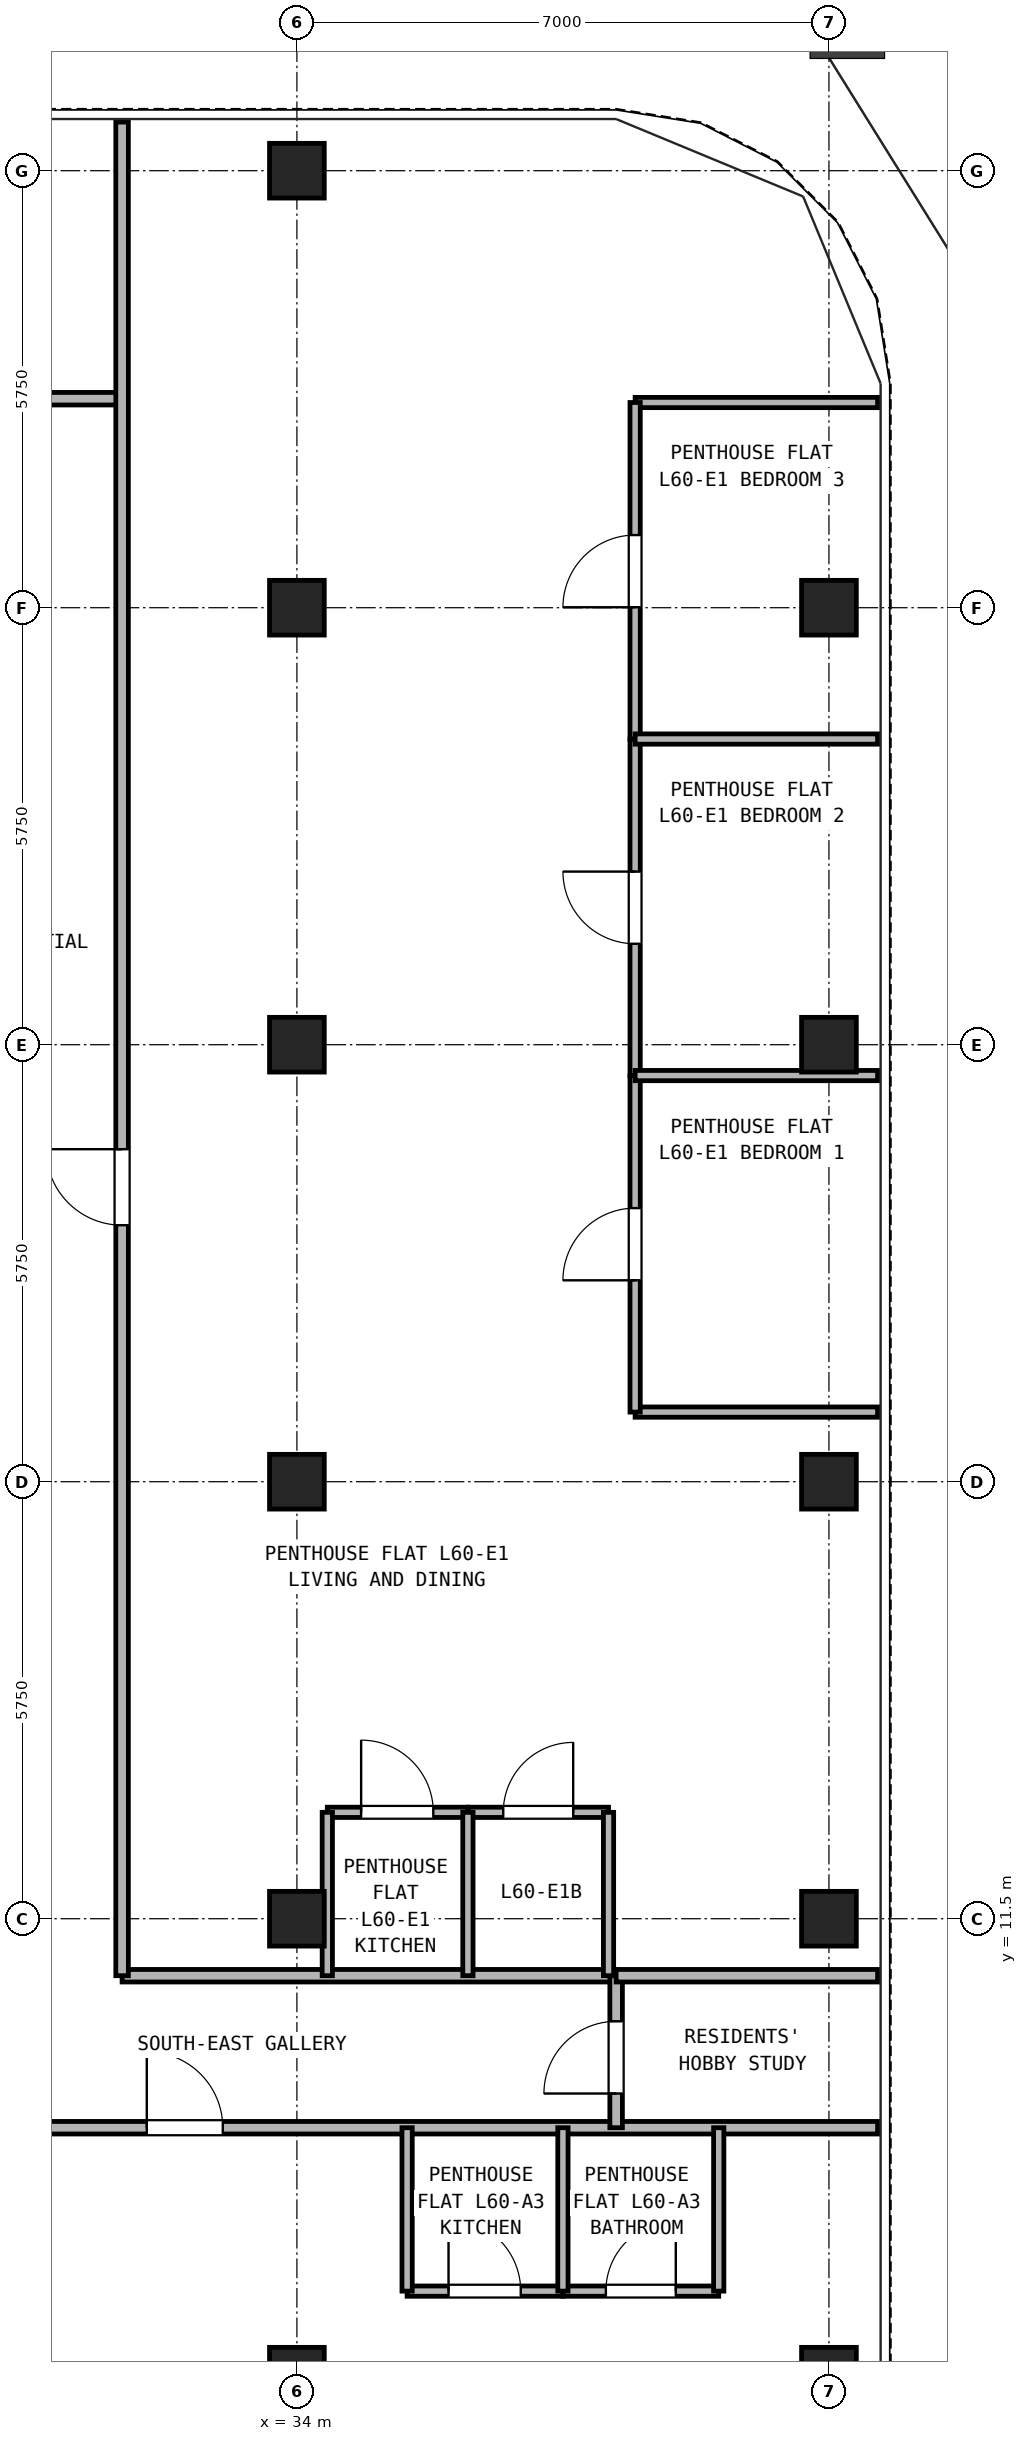
"""IFC4 building model, lengths in metres.
Left out: names, types, materials, properties, quantities, classifications, styles, units other than length and angle.
Written with IfcOpenShell. Run it as: python <this file> out.ifc"""

import sys

from ifc_helpers import new_model, si_unit, direction, frame, frame_2d, origin, origin_2d, place, context, subcontext, project, spatial, rectangle, hollow_rectangle, extrude, source, transform, mapped, element, fill, save


model = new_model("IFC4")
c1 = context("Model", 3, precision=1e-05, world=origin(), true_north=direction((0.0, 1.0)))
c2 = subcontext(c1, "Body", "Model", "MODEL_VIEW")
j1 = project(units=[si_unit("LENGTHUNIT", "METRE"), si_unit("PLANEANGLEUNIT", "RADIAN")], contexts=[c1])
p1 = place(None, origin())
s1 = spatial("IfcSite", under=j1, at=p1, CompositionType="ELEMENT")
p2 = place(p1, origin())
s2 = spatial("IfcBuilding", under=s1, at=p2, CompositionType="ELEMENT")
p3 = place(p2, frame((0.0, 0.0, 212.4)))
s3 = spatial("IfcBuildingStorey", under=s2, at=p3, CompositionType="ELEMENT", Elevation=212.4)
m1 = source(origin(), c2, "Body", "SweptSolid", [
    extrude(hollow_rectangle(XDim=0.72, YDim=0.72, WallThickness=0.04, at=origin_2d()), origin(), (0.0, 0.0, 1.0), 2.84),
])
for number, where, z_axis, x_axis in (
    (1, (34.0, 34.5, 0.0), (0.0, 0.0, 1.0), (1.0, 0.0, 0.0)),
    (2, (41.0, 5.5, 0.0), (0.0, 0.0, 1.0), (1.0, 0.0, 0.0)),
    (3, (41.0, 11.5, 0.0), (0.0, 0.0, 1.0), (1.0, 0.0, 0.0)),
    (4, (41.0, 17.25, 0.0), (0.0, 0.0, 1.0), (1.0, 0.0, 0.0)),
    (5, (41.0, 23.0, 0.0), (0.0, 0.0, 1.0), (1.0, 0.0, 0.0)),
    (6, (41.0, 28.75, 0.0), (0.0, 0.0, 1.0), (1.0, 0.0, 0.0)),
    (7, (34.0, 5.5, 0.0), (0.0, 0.0, 1.0), (1.0, 0.0, 0.0)),
    (8, (34.0, 11.5, 0.0), (0.0, 0.0, 1.0), (1.0, 0.0, 0.0)),
    (9, (34.0, 17.25, 0.0), (0.0, 0.0, 1.0), (1.0, 0.0, 0.0)),
    (10, (34.0, 23.0, 0.0), (0.0, 0.0, 1.0), (1.0, 0.0, 0.0)),
    (11, (34.0, 28.75, 0.0), (0.0, 0.0, 1.0), (1.0, 0.0, 0.0)),
):
    element("IfcColumn", number, at=place(p3, frame(where, z_axis=z_axis, x_axis=x_axis)), inside=s3, PredefinedType="COLUMN", context=c2, shape_type="MappedRepresentation", body=[
        mapped(m1, transform((0.0, 0.0, 0.0), x_axis=(1.0, 0.0, 0.0), y_axis=(0.0, 1.0, 0.0), z_axis=(0.0, 0.0, 1.0), scale=1.0)),
    ])
p4 = place(p3, frame((0.16, 8.75, 0.0), z_axis=(0.0, 0.0, 1.0), x_axis=(1.0, 0.0, 0.0)))
e12 = element("IfcWall", 12, at=p4, inside=s3, PredefinedType="PARTITIONING", context=c2, shape_type="SweptSolid", body=[
    extrude(rectangle(XDim=41.48, YDim=0.165, at=frame_2d((20.74, 0.0))), origin(), (0.0, 0.0, 1.0), 2.84),
])
p5 = place(p4, frame((13.315, 0.0, 0.0)))
e13 = element("IfcOpeningElement", 13, at=p5, cuts=e12, PredefinedType="OPENING", context=c2, shape_type="SweptSolid", body=[
    extrude(rectangle(XDim=1.0, YDim=2.15, at=frame_2d((0.5, 1.075))), frame((0.0, 0.093, 0.0), z_axis=(0.0, -1.0, 0.0), x_axis=(1.0, 0.0, 0.0)), (0.0, 0.0, 1.0), 0.185),
])
p6 = place(p4, frame((19.115, 0.0, 0.0)))
e14 = element("IfcOpeningElement", 14, at=p6, cuts=e12, PredefinedType="OPENING", context=c2, shape_type="SweptSolid", body=[
    extrude(rectangle(XDim=1.0, YDim=2.15, at=frame_2d((0.5, 1.075))), frame((0.0, 0.093, 0.0), z_axis=(0.0, -1.0, 0.0), x_axis=(1.0, 0.0, 0.0)), (0.0, 0.0, 1.0), 0.185),
])
p7 = place(p4, frame((31.865, 0.0, 0.0)))
e15 = element("IfcOpeningElement", 15, at=p7, cuts=e12, PredefinedType="OPENING", context=c2, shape_type="SweptSolid", body=[
    extrude(rectangle(XDim=1.0, YDim=2.15, at=frame_2d((0.5, 1.075))), frame((0.0, 0.093, 0.0), z_axis=(0.0, -1.0, 0.0), x_axis=(1.0, 0.0, 0.0)), (0.0, 0.0, 1.0), 0.185),
])
p8 = place(p3, frame((31.7, 10.75, 0.0), z_axis=(0.0, 0.0, 1.0), x_axis=(1.0, 0.0, 0.0)))
e16 = element("IfcWall", 16, at=p8, inside=s3, PredefinedType="PARTITIONING", context=c2, shape_type="SweptSolid", body=[
    extrude(rectangle(XDim=6.5, YDim=0.165, at=frame_2d((3.25, 0.0))), origin(), (0.0, 0.0, 1.0), 2.84),
])
p9 = place(p3, frame((38.2, 8.75, 0.0), z_axis=(0.0, 0.0, 1.0), x_axis=(0.0, 1.0, 0.0)))
e17 = element("IfcWall", 17, at=p9, inside=s3, PredefinedType="PARTITIONING", context=c2, shape_type="SweptSolid", body=[
    extrude(rectangle(XDim=2.0, YDim=0.165, at=frame_2d((1.0, 0.0))), origin(), (0.0, 0.0, 1.0), 2.84),
])
p10 = place(p9, frame((0.45, 0.0, 0.0)))
e18 = element("IfcOpeningElement", 18, at=p10, cuts=e17, PredefinedType="OPENING", context=c2, shape_type="SweptSolid", body=[
    extrude(rectangle(XDim=0.95, YDim=2.15, at=frame_2d((0.475, 1.075))), frame((0.0, 0.093, 0.0), z_axis=(0.0, -1.0, 0.0), x_axis=(1.0, 0.0, 0.0)), (0.0, 0.0, 1.0), 0.185),
])
p11 = place(p3, frame((15.3, 31.5, 0.0), z_axis=(0.0, 0.0, 1.0), x_axis=(1.0, 0.0, 0.0)))
e19 = element("IfcWall", 19, at=p11, inside=s3, PredefinedType="PARTITIONING", context=c2, shape_type="SweptSolid", body=[
    extrude(rectangle(XDim=16.4, YDim=0.165, at=frame_2d((8.2, 0.0))), origin(), (0.0, 0.0, 1.0), 2.473),
])
p12 = place(p11, frame((2.6, 0.0, 0.0)))
e20 = element("IfcOpeningElement", 20, at=p12, cuts=e19, PredefinedType="OPENING", context=c2, shape_type="SweptSolid", body=[
    extrude(rectangle(XDim=0.95, YDim=2.15, at=frame_2d((0.475, 1.075))), frame((0.0, 0.093, 0.0), z_axis=(0.0, -1.0, 0.0), x_axis=(1.0, 0.0, 0.0)), (0.0, 0.0, 1.0), 0.185),
])
p13 = place(p11, frame((7.9, 0.0, 0.0)))
e21 = element("IfcOpeningElement", 21, at=p13, cuts=e19, PredefinedType="OPENING", context=c2, shape_type="SweptSolid", body=[
    extrude(rectangle(XDim=0.95, YDim=2.15, at=frame_2d((0.475, 1.075))), frame((0.0, 0.093, 0.0), z_axis=(0.0, -1.0, 0.0), x_axis=(1.0, 0.0, 0.0)), (0.0, 0.0, 1.0), 0.185),
])
p14 = place(p11, frame((13.0, 0.0, 0.0)))
e22 = element("IfcOpeningElement", 22, at=p14, cuts=e19, PredefinedType="OPENING", context=c2, shape_type="SweptSolid", body=[
    extrude(rectangle(XDim=0.92, YDim=2.1, at=frame_2d((0.46, 1.05))), frame((0.0, 0.093, 0.0), z_axis=(0.0, -1.0, 0.0), x_axis=(1.0, 0.0, 0.0)), (0.0, 0.0, 1.0), 0.185),
])
p15 = place(p3, frame((31.7, 10.75, 0.0), z_axis=(0.0, 0.0, 1.0), x_axis=(0.0, 1.0, 0.0)))
e23 = element("IfcWall", 23, at=p15, inside=s3, PredefinedType="PARTITIONING", context=c2, shape_type="SweptSolid", body=[
    extrude(rectangle(XDim=24.39, YDim=0.165, at=frame_2d((12.195, 0.0))), origin(), (0.0, 0.0, 1.0), 2.84),
])
p16 = place(p15, frame((9.875, 0.0, 0.0)))
e24 = element("IfcOpeningElement", 24, at=p16, cuts=e23, PredefinedType="OPENING", context=c2, shape_type="SweptSolid", body=[
    extrude(rectangle(XDim=1.0, YDim=2.15, at=frame_2d((0.5, 1.075))), frame((0.0, 0.093, 0.0), z_axis=(0.0, -1.0, 0.0), x_axis=(1.0, 0.0, 0.0)), (0.0, 0.0, 1.0), 0.185),
])
p17 = place(p3, frame((35.45, 6.6, 0.0), z_axis=(0.0, 0.0, 1.0), x_axis=(1.0, 0.0, 0.0)))
e25 = element("IfcWall", 25, at=p17, inside=s3, PredefinedType="PARTITIONING", context=c2, shape_type="SweptSolid", body=[
    extrude(rectangle(XDim=2.05, YDim=0.135, at=frame_2d((1.025, 0.0))), origin(), (0.0, 0.0, 1.0), 2.84),
])
p18 = place(p17, frame((0.545, 0.0, 0.0)))
e26 = element("IfcOpeningElement", 26, at=p18, cuts=e25, PredefinedType="OPENING", context=c2, shape_type="SweptSolid", body=[
    extrude(rectangle(XDim=0.95, YDim=2.15, at=frame_2d((0.475, 1.075))), frame((0.0, 0.077, 0.0), z_axis=(0.0, -1.0, 0.0), x_axis=(1.0, 0.0, 0.0)), (0.0, 0.0, 1.0), 0.155),
])
p19 = place(p3, frame((37.5, 6.6, 0.0), z_axis=(0.0, 0.0, 1.0), x_axis=(1.0, 0.0, 0.0)))
e27 = element("IfcWall", 27, at=p19, inside=s3, PredefinedType="PARTITIONING", context=c2, shape_type="SweptSolid", body=[
    extrude(rectangle(XDim=2.05, YDim=0.135, at=frame_2d((1.025, 0.0))), origin(), (0.0, 0.0, 1.0), 2.84),
])
p20 = place(p19, frame((0.565, 0.0, 0.0)))
e28 = element("IfcOpeningElement", 28, at=p20, cuts=e27, PredefinedType="OPENING", context=c2, shape_type="SweptSolid", body=[
    extrude(rectangle(XDim=0.92, YDim=2.1, at=frame_2d((0.46, 1.05))), frame((0.0, 0.077, 0.0), z_axis=(0.0, -1.0, 0.0), x_axis=(1.0, 0.0, 0.0)), (0.0, 0.0, 1.0), 0.155),
])
for number, where, z_axis, x_axis in (
    (29, (35.45, 6.6, 0.0), (0.0, 0.0, 1.0), (0.0, 1.0, 0.0)),
    (30, (37.5, 6.6, 0.0), (0.0, 0.0, 1.0), (0.0, 1.0, 0.0)),
    (31, (39.55, 6.6, 0.0), (0.0, 0.0, 1.0), (0.0, 1.0, 0.0)),
):
    element("IfcWall", number, at=place(p3, frame(where, z_axis=z_axis, x_axis=x_axis)), inside=s3, PredefinedType="PARTITIONING", context=c2, shape_type="SweptSolid", body=[
        extrude(rectangle(XDim=2.15, YDim=0.135, at=frame_2d((1.075, 0.0))), origin(), (0.0, 0.0, 1.0), 2.84),
    ])
p21 = place(p3, frame((38.2, 10.75, 0.0), z_axis=(0.0, 0.0, 1.0), x_axis=(1.0, 0.0, 0.0)))
e32 = element("IfcWall", 32, at=p21, inside=s3, PredefinedType="PARTITIONING", context=c2, shape_type="SweptSolid", body=[
    extrude(rectangle(XDim=3.44, YDim=0.165, at=frame_2d((1.72, 0.0))), origin(), (0.0, 0.0, 1.0), 2.84),
])
p22 = place(p3, frame((34.4, 12.9, 0.0), z_axis=(0.0, 0.0, 1.0), x_axis=(1.0, 0.0, 0.0)))
e33 = element("IfcWall", 33, at=p22, inside=s3, PredefinedType="PARTITIONING", context=c2, shape_type="SweptSolid", body=[
    extrude(rectangle(XDim=1.85, YDim=0.135, at=frame_2d((0.925, 0.0))), origin(), (0.0, 0.0, 1.0), 2.84),
])
p23 = place(p22, frame((0.445, 0.0, 0.0)))
e34 = element("IfcOpeningElement", 34, at=p23, cuts=e33, PredefinedType="OPENING", context=c2, shape_type="SweptSolid", body=[
    extrude(rectangle(XDim=0.95, YDim=2.15, at=frame_2d((0.475, 1.075))), frame((0.0, 0.077, 0.0), z_axis=(0.0, -1.0, 0.0), x_axis=(1.0, 0.0, 0.0)), (0.0, 0.0, 1.0), 0.155),
])
p24 = place(p3, frame((36.25, 12.9, 0.0), z_axis=(0.0, 0.0, 1.0), x_axis=(1.0, 0.0, 0.0)))
e35 = element("IfcWall", 35, at=p24, inside=s3, PredefinedType="PARTITIONING", context=c2, shape_type="SweptSolid", body=[
    extrude(rectangle(XDim=1.85, YDim=0.135, at=frame_2d((0.925, 0.0))), origin(), (0.0, 0.0, 1.0), 2.84),
])
p25 = place(p24, frame((0.465, 0.0, 0.0)))
e36 = element("IfcOpeningElement", 36, at=p25, cuts=e35, PredefinedType="OPENING", context=c2, shape_type="SweptSolid", body=[
    extrude(rectangle(XDim=0.92, YDim=2.1, at=frame_2d((0.46, 1.05))), frame((0.0, 0.077, 0.0), z_axis=(0.0, -1.0, 0.0), x_axis=(1.0, 0.0, 0.0)), (0.0, 0.0, 1.0), 0.155),
])
for number, where, z_axis, x_axis in (
    (37, (34.4, 10.75, 0.0), (0.0, 0.0, 1.0), (0.0, 1.0, 0.0)),
    (38, (36.25, 10.75, 0.0), (0.0, 0.0, 1.0), (0.0, 1.0, 0.0)),
    (39, (38.1, 10.75, 0.0), (0.0, 0.0, 1.0), (0.0, 1.0, 0.0)),
):
    element("IfcWall", number, at=place(p3, frame(where, z_axis=z_axis, x_axis=x_axis)), inside=s3, PredefinedType="PARTITIONING", context=c2, shape_type="SweptSolid", body=[
        extrude(rectangle(XDim=2.15, YDim=0.135, at=frame_2d((1.075, 0.0))), origin(), (0.0, 0.0, 1.0), 2.84),
    ])
for number, where, z_axis, x_axis in (
    (40, (38.45, 18.166, 0.0), (0.0, 0.0, 1.0), (1.0, 0.0, 0.0)),
    (41, (38.45, 31.45, 0.0), (0.0, 0.0, 1.0), (1.0, 0.0, 0.0)),
):
    element("IfcWall", number, at=place(p3, frame(where, z_axis=z_axis, x_axis=x_axis)), inside=s3, PredefinedType="PARTITIONING", context=c2, shape_type="SweptSolid", body=[
        extrude(rectangle(XDim=3.19, YDim=0.135, at=frame_2d((1.595, 0.0))), origin(), (0.0, 0.0, 1.0), 2.84),
    ])
p26 = place(p3, frame((38.45, 18.166, 0.0), z_axis=(0.0, 0.0, 1.0), x_axis=(0.0, 1.0, 0.0)))
e42 = element("IfcWall", 42, at=p26, inside=s3, PredefinedType="PARTITIONING", context=c2, shape_type="SweptSolid", body=[
    extrude(rectangle(XDim=4.428, YDim=0.135, at=frame_2d((2.214, 0.0))), origin(), (0.0, 0.0, 1.0), 2.84),
])
p27 = place(p26, frame((1.734, 0.0, 0.0)))
e43 = element("IfcOpeningElement", 43, at=p27, cuts=e42, PredefinedType="OPENING", context=c2, shape_type="SweptSolid", body=[
    extrude(rectangle(XDim=0.95, YDim=2.15, at=frame_2d((0.475, 1.075))), frame((0.0, 0.077, 0.0), z_axis=(0.0, -1.0, 0.0), x_axis=(1.0, 0.0, 0.0)), (0.0, 0.0, 1.0), 0.155),
])
p28 = place(p3, frame((38.45, 22.594, 0.0), z_axis=(0.0, 0.0, 1.0), x_axis=(0.0, 1.0, 0.0)))
e44 = element("IfcWall", 44, at=p28, inside=s3, PredefinedType="PARTITIONING", context=c2, shape_type="SweptSolid", body=[
    extrude(rectangle(XDim=4.428, YDim=0.135, at=frame_2d((2.214, 0.0))), origin(), (0.0, 0.0, 1.0), 2.84),
])
p29 = place(p28, frame((1.734, 0.0, 0.0)))
e45 = element("IfcOpeningElement", 45, at=p29, cuts=e44, PredefinedType="OPENING", context=c2, shape_type="SweptSolid", body=[
    extrude(rectangle(XDim=0.95, YDim=2.15, at=frame_2d((0.475, 1.075))), frame((0.0, 0.077, 0.0), z_axis=(0.0, -1.0, 0.0), x_axis=(1.0, 0.0, 0.0)), (0.0, 0.0, 1.0), 0.155),
])
p30 = place(p3, frame((38.45, 22.594, 0.0), z_axis=(0.0, 0.0, 1.0), x_axis=(1.0, 0.0, 0.0)))
e46 = element("IfcWall", 46, at=p30, inside=s3, PredefinedType="PARTITIONING", context=c2, shape_type="SweptSolid", body=[
    extrude(rectangle(XDim=3.19, YDim=0.135, at=frame_2d((1.595, 0.0))), origin(), (0.0, 0.0, 1.0), 2.84),
])
p31 = place(p3, frame((38.45, 27.022, 0.0), z_axis=(0.0, 0.0, 1.0), x_axis=(0.0, 1.0, 0.0)))
e47 = element("IfcWall", 47, at=p31, inside=s3, PredefinedType="PARTITIONING", context=c2, shape_type="SweptSolid", body=[
    extrude(rectangle(XDim=4.428, YDim=0.135, at=frame_2d((2.214, 0.0))), origin(), (0.0, 0.0, 1.0), 2.84),
])
p32 = place(p31, frame((1.734, 0.0, 0.0)))
e48 = element("IfcOpeningElement", 48, at=p32, cuts=e47, PredefinedType="OPENING", context=c2, shape_type="SweptSolid", body=[
    extrude(rectangle(XDim=0.95, YDim=2.15, at=frame_2d((0.475, 1.075))), frame((0.0, 0.077, 0.0), z_axis=(0.0, -1.0, 0.0), x_axis=(1.0, 0.0, 0.0)), (0.0, 0.0, 1.0), 0.155),
])
p33 = place(p3, frame((38.45, 27.022, 0.0), z_axis=(0.0, 0.0, 1.0), x_axis=(1.0, 0.0, 0.0)))
e49 = element("IfcWall", 49, at=p33, inside=s3, PredefinedType="PARTITIONING", context=c2, shape_type="SweptSolid", body=[
    extrude(rectangle(XDim=3.19, YDim=0.135, at=frame_2d((1.595, 0.0))), origin(), (0.0, 0.0, 1.0), 2.84),
])
p34 = place(p18, origin())
e50 = element("IfcDoor", 50, at=p34, inside=s3, OperationType="SINGLE_SWING_LEFT", PredefinedType="DOOR", context=c2, shape_type="SweptSolid", body=[
    extrude(rectangle(XDim=0.95, YDim=2.15, at=frame_2d((0.475, 1.075))), frame((0.0, 0.025, 0.0), z_axis=(0.0, -1.0, 0.0), x_axis=(1.0, 0.0, 0.0)), (0.0, 0.0, 1.0), 0.05),
])
fill(e26, e50)
p35 = place(p20, origin())
e51 = element("IfcDoor", 51, at=p35, inside=s3, OperationType="SINGLE_SWING_RIGHT", PredefinedType="DOOR", context=c2, shape_type="SweptSolid", body=[
    extrude(rectangle(XDim=0.92, YDim=2.1, at=frame_2d((0.46, 1.05))), frame((0.0, 0.025, 0.0), z_axis=(0.0, -1.0, 0.0), x_axis=(1.0, 0.0, 0.0)), (0.0, 0.0, 1.0), 0.05),
])
fill(e28, e51)
p36 = place(p7, frame((1.0, 0.0, 0.0), z_axis=(0.0, 0.0, 1.0), x_axis=(-1.0, 0.0, 0.0)))
e52 = element("IfcDoor", 52, at=p36, inside=s3, OperationType="SINGLE_SWING_LEFT", PredefinedType="DOOR", context=c2, shape_type="SweptSolid", body=[
    extrude(rectangle(XDim=1.0, YDim=2.15, at=frame_2d((0.5, 1.075))), frame((0.0, 0.025, 0.0), z_axis=(0.0, -1.0, 0.0), x_axis=(1.0, 0.0, 0.0)), (0.0, 0.0, 1.0), 0.05),
])
fill(e15, e52)
p37 = place(p10, origin())
e53 = element("IfcDoor", 53, at=p37, inside=s3, OperationType="SINGLE_SWING_LEFT", PredefinedType="DOOR", context=c2, shape_type="SweptSolid", body=[
    extrude(rectangle(XDim=0.95, YDim=2.15, at=frame_2d((0.475, 1.075))), frame((0.0, 0.025, 0.0), z_axis=(0.0, -1.0, 0.0), x_axis=(1.0, 0.0, 0.0)), (0.0, 0.0, 1.0), 0.05),
])
fill(e18, e53)
p38 = place(p23, origin())
e54 = element("IfcDoor", 54, at=p38, inside=s3, OperationType="SINGLE_SWING_LEFT", PredefinedType="DOOR", context=c2, shape_type="SweptSolid", body=[
    extrude(rectangle(XDim=0.95, YDim=2.15, at=frame_2d((0.475, 1.075))), frame((0.0, 0.025, 0.0), z_axis=(0.0, -1.0, 0.0), x_axis=(1.0, 0.0, 0.0)), (0.0, 0.0, 1.0), 0.05),
])
fill(e34, e54)
p39 = place(p25, origin())
e55 = element("IfcDoor", 55, at=p39, inside=s3, OperationType="SINGLE_SWING_RIGHT", PredefinedType="DOOR", context=c2, shape_type="SweptSolid", body=[
    extrude(rectangle(XDim=0.92, YDim=2.1, at=frame_2d((0.46, 1.05))), frame((0.0, 0.025, 0.0), z_axis=(0.0, -1.0, 0.0), x_axis=(1.0, 0.0, 0.0)), (0.0, 0.0, 1.0), 0.05),
])
fill(e36, e55)
p40 = place(p27, frame((0.95, 0.0, 0.0), z_axis=(0.0, 0.0, 1.0), x_axis=(-1.0, 0.0, 0.0)))
e56 = element("IfcDoor", 56, at=p40, inside=s3, OperationType="SINGLE_SWING_LEFT", PredefinedType="DOOR", context=c2, shape_type="SweptSolid", body=[
    extrude(rectangle(XDim=0.95, YDim=2.15, at=frame_2d((0.475, 1.075))), frame((0.0, 0.025, 0.0), z_axis=(0.0, -1.0, 0.0), x_axis=(1.0, 0.0, 0.0)), (0.0, 0.0, 1.0), 0.05),
])
fill(e43, e56)
p41 = place(p29, frame((0.95, 0.0, 0.0), z_axis=(0.0, 0.0, 1.0), x_axis=(-1.0, 0.0, 0.0)))
e57 = element("IfcDoor", 57, at=p41, inside=s3, OperationType="SINGLE_SWING_RIGHT", PredefinedType="DOOR", context=c2, shape_type="SweptSolid", body=[
    extrude(rectangle(XDim=0.95, YDim=2.15, at=frame_2d((0.475, 1.075))), frame((0.0, 0.025, 0.0), z_axis=(0.0, -1.0, 0.0), x_axis=(1.0, 0.0, 0.0)), (0.0, 0.0, 1.0), 0.05),
])
fill(e45, e57)
p42 = place(p32, frame((0.95, 0.0, 0.0), z_axis=(0.0, 0.0, 1.0), x_axis=(-1.0, 0.0, 0.0)))
e58 = element("IfcDoor", 58, at=p42, inside=s3, OperationType="SINGLE_SWING_LEFT", PredefinedType="DOOR", context=c2, shape_type="SweptSolid", body=[
    extrude(rectangle(XDim=0.95, YDim=2.15, at=frame_2d((0.475, 1.075))), frame((0.0, 0.025, 0.0), z_axis=(0.0, -1.0, 0.0), x_axis=(1.0, 0.0, 0.0)), (0.0, 0.0, 1.0), 0.05),
])
fill(e48, e58)
p43 = place(p16, frame((1.0, 0.0, 0.0), z_axis=(0.0, 0.0, 1.0), x_axis=(-1.0, 0.0, 0.0)))
e59 = element("IfcDoor", 59, at=p43, inside=s3, OperationType="SINGLE_SWING_RIGHT", PredefinedType="DOOR", context=c2, shape_type="SweptSolid", body=[
    extrude(rectangle(XDim=1.0, YDim=2.15, at=frame_2d((0.5, 1.075))), frame((0.0, 0.025, 0.0), z_axis=(0.0, -1.0, 0.0), x_axis=(1.0, 0.0, 0.0)), (0.0, 0.0, 1.0), 0.05),
])
fill(e24, e59)
save(model, sys.argv[1])
